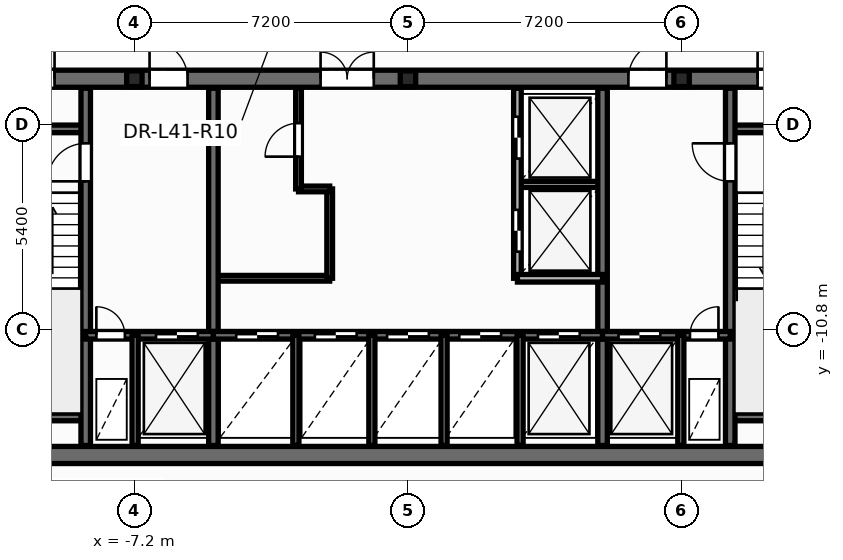
"""IFC4 building model, lengths in metres.
Left out: names, types, materials, properties, quantities, classifications, styles, units other than length and angle.
Written with IfcOpenShell. Run it as: python <this file> out.ifc"""

import sys

from ifc_helpers import new_model, si_unit, direction, frame, frame_2d, origin, origin_2d, place, context, subcontext, project, spatial, rectangle, i_section, extrude, element, fill, save


model = new_model("IFC4")
c1 = context("Model", 3, precision=1e-05, world=origin(), true_north=direction((0.0, 1.0)))
c2 = subcontext(c1, "Body", "Model", "MODEL_VIEW")
j1 = project(units=[si_unit("LENGTHUNIT", "METRE"), si_unit("PLANEANGLEUNIT", "RADIAN")], contexts=[c1])
p1 = place(None, origin())
s1 = spatial("IfcSite", under=j1, at=p1, CompositionType="ELEMENT")
p2 = place(p1, origin())
s2 = spatial("IfcBuilding", under=s1, at=p2, CompositionType="ELEMENT")
p3 = place(p2, frame((0.0, 0.0, 158.1)))
s3 = spatial("IfcBuildingStorey", under=s2, at=p3, CompositionType="ELEMENT", Elevation=158.1)
for number, where, z_axis, x_axis in (
    (1, (-7.2, -4.2, 0.0), (0.0, 0.0, 1.0), (1.0, 0.0, 0.0)),
    (2, (0.0, -4.2, 0.0), (0.0, 0.0, 1.0), (1.0, 0.0, 0.0)),
    (3, (7.2, -4.2, 0.0), (0.0, 0.0, 1.0), (1.0, 0.0, 0.0)),
):
    element("IfcColumn", number, at=place(p3, frame(where, z_axis=z_axis, x_axis=x_axis)), inside=s3, PredefinedType="PILASTER", context=c2, shape_type="SweptSolid", body=[
        extrude(i_section(OverallWidth=0.405, OverallDepth=0.414, WebThickness=0.022, FlangeThickness=0.032, at=origin_2d()), origin(), (0.0, 0.0, 1.0), 3.6),
    ])
p4 = place(p3, frame((-5.12, -9.45, 0.0), z_axis=(0.0, 0.0, 1.0), x_axis=(1.0, 0.0, 0.0)))
e4 = element("IfcWall", 4, at=p4, inside=s3, PredefinedType="PARTITIONING", context=c2, shape_type="SweptSolid", body=[
    extrude(rectangle(XDim=3.06, YDim=0.15, at=frame_2d((1.53, 0.0))), origin(), (0.0, 0.0, 1.0), 3.35),
])
p5 = place(p3, frame((-2.06, -9.45, 0.0), z_axis=(0.0, 0.0, 1.0), x_axis=(0.0, 1.0, 0.0)))
e5 = element("IfcWall", 5, at=p5, inside=s3, PredefinedType="PARTITIONING", context=c2, shape_type="SweptSolid", body=[
    extrude(rectangle(XDim=2.35, YDim=0.15, at=frame_2d((1.175, 0.0))), origin(), (0.0, 0.0, 1.0), 3.35),
])
p6 = place(p3, frame((-2.88, -7.1, 0.0), z_axis=(0.0, 0.0, 1.0), x_axis=(1.0, 0.0, 0.0)))
e6 = element("IfcWall", 6, at=p6, inside=s3, PredefinedType="PARTITIONING", context=c2, shape_type="SweptSolid", body=[
    extrude(rectangle(XDim=0.82, YDim=0.15, at=frame_2d((0.41, 0.0))), origin(), (0.0, 0.0, 1.0), 3.35),
])
p7 = place(p3, frame((-2.88, -7.1, 0.0), z_axis=(0.0, 0.0, 1.0), x_axis=(0.0, 1.0, 0.0)))
e7 = element("IfcWall", 7, at=p7, inside=s3, PredefinedType="PARTITIONING", context=c2, shape_type="SweptSolid", body=[
    extrude(rectangle(XDim=2.65, YDim=0.15, at=frame_2d((1.325, 0.0))), origin(), (0.0, 0.0, 1.0), 3.35),
])
p8 = place(p7, frame((0.85, 0.0, 0.0)))
e8 = element("IfcOpeningElement", 8, at=p8, cuts=e7, PredefinedType="OPENING", context=c2, shape_type="SweptSolid", body=[
    extrude(rectangle(XDim=0.886, YDim=2.104, at=frame_2d((0.44, 1.052))), frame((0.0, 0.085, 0.0), z_axis=(0.0, -1.0, 0.0), x_axis=(1.0, 0.0, 0.0)), (0.0, 0.0, 1.0), 0.17),
])
p9 = place(p3, frame((2.88, -6.98, 0.0), z_axis=(0.0, 0.0, 1.0), x_axis=(1.0, 0.0, 0.0)))
e9 = element("IfcWall", 9, at=p9, inside=s3, PredefinedType="PARTITIONING", context=c2, shape_type="SweptSolid", body=[
    extrude(rectangle(XDim=2.24, YDim=0.16, at=frame_2d((1.12, 0.0))), origin(), (0.0, 0.0, 1.0), 3.35),
])
p10 = place(p3, frame((-12.65, -14.1, 0.0), z_axis=(0.0, 0.0, 1.0), x_axis=(1.0, 0.0, 0.0)))
e10 = element("IfcWall", 10, at=p10, inside=s3, PredefinedType="SHEAR", context=c2, shape_type="SweptSolid", body=[
    extrude(rectangle(XDim=25.3, YDim=0.45, at=frame_2d((12.65, 0.0))), origin(), (0.0, 0.0, 1.0), 3.6),
])
p11 = place(p3, frame((-12.65, -4.2, 0.0), z_axis=(0.0, 0.0, 1.0), x_axis=(1.0, 0.0, 0.0)))
e11 = element("IfcWall", 11, at=p11, inside=s3, PredefinedType="SHEAR", context=c2, shape_type="SweptSolid", body=[
    extrude(rectangle(XDim=25.3, YDim=0.45, at=frame_2d((12.65, 0.0))), origin(), (0.0, 0.0, 1.0), 3.6),
])
p12 = place(p11, frame((0.95, 0.0, 0.0)))
e12 = element("IfcOpeningElement", 12, at=p12, cuts=e11, PredefinedType="OPENING", context=c2, shape_type="SweptSolid", body=[
    extrude(rectangle(XDim=0.756, YDim=2.054, at=frame_2d((0.375, 1.027))), frame((0.0, 0.235, 0.0), z_axis=(0.0, -1.0, 0.0), x_axis=(1.0, 0.0, 0.0)), (0.0, 0.0, 1.0), 0.47),
])
p13 = place(p11, frame((2.6, 0.0, 0.0)))
e13 = element("IfcOpeningElement", 13, at=p13, cuts=e11, PredefinedType="OPENING", context=c2, shape_type="SweptSolid", body=[
    extrude(rectangle(XDim=0.756, YDim=2.054, at=frame_2d((0.375, 1.027))), frame((0.0, 0.235, 0.0), z_axis=(0.0, -1.0, 0.0), x_axis=(1.0, 0.0, 0.0)), (0.0, 0.0, 1.0), 0.47),
])
p14 = place(p11, frame((21.85, 0.0, 0.0)))
e14 = element("IfcOpeningElement", 14, at=p14, cuts=e11, PredefinedType="OPENING", context=c2, shape_type="SweptSolid", body=[
    extrude(rectangle(XDim=0.756, YDim=2.054, at=frame_2d((0.375, 1.027))), frame((0.0, 0.235, 0.0), z_axis=(0.0, -1.0, 0.0), x_axis=(1.0, 0.0, 0.0)), (0.0, 0.0, 1.0), 0.47),
])
p15 = place(p11, frame((23.5, 0.0, 0.0)))
e15 = element("IfcOpeningElement", 15, at=p15, cuts=e11, PredefinedType="OPENING", context=c2, shape_type="SweptSolid", body=[
    extrude(rectangle(XDim=0.756, YDim=2.054, at=frame_2d((0.375, 1.027))), frame((0.0, 0.235, 0.0), z_axis=(0.0, -1.0, 0.0), x_axis=(1.0, 0.0, 0.0)), (0.0, 0.0, 1.0), 0.47),
])
p16 = place(p11, frame((5.85, 0.0, 0.0)))
e16 = element("IfcOpeningElement", 16, at=p16, cuts=e11, PredefinedType="OPENING", context=c2, shape_type="SweptSolid", body=[
    extrude(rectangle(XDim=1.006, YDim=2.104, at=frame_2d((0.5, 1.052))), frame((0.0, 0.235, 0.0), z_axis=(0.0, -1.0, 0.0), x_axis=(1.0, 0.0, 0.0)), (0.0, 0.0, 1.0), 0.47),
])
p17 = place(p11, frame((10.35, 0.0, 0.0)))
e17 = element("IfcOpeningElement", 17, at=p17, cuts=e11, PredefinedType="OPENING", context=c2, shape_type="SweptSolid", body=[
    extrude(rectangle(XDim=1.406, YDim=2.154, at=frame_2d((0.7, 1.077))), frame((0.0, 0.235, 0.0), z_axis=(0.0, -1.0, 0.0), x_axis=(1.0, 0.0, 0.0)), (0.0, 0.0, 1.0), 0.47),
])
p18 = place(p11, frame((18.45, 0.0, 0.0)))
e18 = element("IfcOpeningElement", 18, at=p18, cuts=e11, PredefinedType="OPENING", context=c2, shape_type="SweptSolid", body=[
    extrude(rectangle(XDim=1.006, YDim=2.104, at=frame_2d((0.5, 1.052))), frame((0.0, 0.235, 0.0), z_axis=(0.0, -1.0, 0.0), x_axis=(1.0, 0.0, 0.0)), (0.0, 0.0, 1.0), 0.47),
])
for number, where, z_axis, x_axis in (
    (19, (-12.35, -5.52, 0.0), (0.0, 0.0, 1.0), (1.0, 0.0, 0.0)),
    (20, (-12.35, -13.1, 0.0), (0.0, 0.0, 1.0), (1.0, 0.0, 0.0)),
    (21, (8.48, -5.52, 0.0), (0.0, 0.0, 1.0), (1.0, 0.0, 0.0)),
    (22, (8.48, -13.1, 0.0), (0.0, 0.0, 1.0), (1.0, 0.0, 0.0)),
):
    element("IfcWall", number, at=place(p3, frame(where, z_axis=z_axis, x_axis=x_axis)), inside=s3, PredefinedType="SOLIDWALL", context=c2, shape_type="SweptSolid", body=[
        extrude(rectangle(XDim=3.87, YDim=0.2, at=frame_2d((1.935, 0.0))), origin(), (0.0, 0.0, 1.0), 3.6),
    ])
p19 = place(p3, frame((-8.48, -13.85, 0.0), z_axis=(0.0, 0.0, 1.0), x_axis=(0.0, 1.0, 0.0)))
e23 = element("IfcWall", 23, at=p19, inside=s3, PredefinedType="SHEAR", context=c2, shape_type="SweptSolid", body=[
    extrude(rectangle(XDim=9.4, YDim=0.25, at=frame_2d((4.7, 0.0))), origin(), (0.0, 0.0, 1.0), 3.6),
])
p20 = place(p19, frame((6.95, 0.0, 0.0)))
e24 = element("IfcOpeningElement", 24, at=p20, cuts=e23, PredefinedType="OPENING", context=c2, shape_type="SweptSolid", body=[
    extrude(rectangle(XDim=1.006, YDim=2.104, at=frame_2d((0.5, 1.052))), frame((0.0, 0.135, 0.0), z_axis=(0.0, -1.0, 0.0), x_axis=(1.0, 0.0, 0.0)), (0.0, 0.0, 1.0), 0.27),
])
p21 = place(p3, frame((8.48, -13.85, 0.0), z_axis=(0.0, 0.0, 1.0), x_axis=(0.0, 1.0, 0.0)))
e25 = element("IfcWall", 25, at=p21, inside=s3, PredefinedType="SHEAR", context=c2, shape_type="SweptSolid", body=[
    extrude(rectangle(XDim=9.4, YDim=0.25, at=frame_2d((4.7, 0.0))), origin(), (0.0, 0.0, 1.0), 3.6),
])
p22 = place(p21, frame((6.95, 0.0, 0.0)))
e26 = element("IfcOpeningElement", 26, at=p22, cuts=e25, PredefinedType="OPENING", context=c2, shape_type="SweptSolid", body=[
    extrude(rectangle(XDim=1.006, YDim=2.104, at=frame_2d((0.5, 1.052))), frame((0.0, 0.135, 0.0), z_axis=(0.0, -1.0, 0.0), x_axis=(1.0, 0.0, 0.0)), (0.0, 0.0, 1.0), 0.27),
])
for number, where, z_axis, x_axis in (
    (27, (-5.12, -13.85, 0.0), (0.0, 0.0, 1.0), (0.0, 1.0, 0.0)),
    (28, (5.12, -13.85, 0.0), (0.0, 0.0, 1.0), (0.0, 1.0, 0.0)),
):
    element("IfcWall", number, at=place(p3, frame(where, z_axis=z_axis, x_axis=x_axis)), inside=s3, PredefinedType="SHEAR", context=c2, shape_type="SweptSolid", body=[
        extrude(rectangle(XDim=9.4, YDim=0.25, at=frame_2d((4.7, 0.0))), origin(), (0.0, 0.0, 1.0), 3.6),
    ])
p23 = place(p3, frame((-8.48, -10.95, 0.0), z_axis=(0.0, 0.0, 1.0), x_axis=(1.0, 0.0, 0.0)))
e29 = element("IfcWall", 29, at=p23, inside=s3, PredefinedType="SOLIDWALL", context=c2, shape_type="SweptSolid", body=[
    extrude(rectangle(XDim=3.36, YDim=0.2, at=frame_2d((1.68, 0.0))), origin(), (0.0, 0.0, 1.0), 3.6),
])
p24 = place(p23, frame((0.28, 0.0, 0.0)))
e30 = element("IfcOpeningElement", 30, at=p24, cuts=e29, PredefinedType="OPENING", context=c2, shape_type="SweptSolid", body=[
    extrude(rectangle(XDim=0.756, YDim=2.054, at=frame_2d((0.375, 1.027))), frame((0.0, 0.11, 0.0), z_axis=(0.0, -1.0, 0.0), x_axis=(1.0, 0.0, 0.0)), (0.0, 0.0, 1.0), 0.22),
])
p25 = place(p23, frame((1.85, 0.0, 0.0)))
e31 = element("IfcOpeningElement", 31, at=p25, cuts=e29, PredefinedType="OPENING", context=c2, shape_type="SweptSolid", body=[
    extrude(rectangle(XDim=1.106, YDim=2.104, at=frame_2d((0.55, 1.052))), frame((0.0, 0.11, 0.0), z_axis=(0.0, -1.0, 0.0), x_axis=(1.0, 0.0, 0.0)), (0.0, 0.0, 1.0), 0.22),
])
p26 = place(p3, frame((-5.12, -10.95, 0.0), z_axis=(0.0, 0.0, 1.0), x_axis=(1.0, 0.0, 0.0)))
e32 = element("IfcWall", 32, at=p26, inside=s3, PredefinedType="SOLIDWALL", context=c2, shape_type="SweptSolid", body=[
    extrude(rectangle(XDim=10.24, YDim=0.2, at=frame_2d((5.12, 0.0))), origin(), (0.0, 0.0, 1.0), 3.6),
])
p27 = place(p26, frame((0.6, 0.0, 0.0)))
e33 = element("IfcOpeningElement", 33, at=p27, cuts=e32, PredefinedType="OPENING", context=c2, shape_type="SweptSolid", body=[
    extrude(rectangle(XDim=1.106, YDim=2.104, at=frame_2d((0.55, 1.052))), frame((0.0, 0.11, 0.0), z_axis=(0.0, -1.0, 0.0), x_axis=(1.0, 0.0, 0.0)), (0.0, 0.0, 1.0), 0.22),
])
p28 = place(p26, frame((2.67, 0.0, 0.0)))
e34 = element("IfcOpeningElement", 34, at=p28, cuts=e32, PredefinedType="OPENING", context=c2, shape_type="SweptSolid", body=[
    extrude(rectangle(XDim=1.106, YDim=2.104, at=frame_2d((0.55, 1.052))), frame((0.0, 0.11, 0.0), z_axis=(0.0, -1.0, 0.0), x_axis=(1.0, 0.0, 0.0)), (0.0, 0.0, 1.0), 0.22),
])
p29 = place(p26, frame((4.57, 0.0, 0.0)))
e35 = element("IfcOpeningElement", 35, at=p29, cuts=e32, PredefinedType="OPENING", context=c2, shape_type="SweptSolid", body=[
    extrude(rectangle(XDim=1.106, YDim=2.104, at=frame_2d((0.55, 1.052))), frame((0.0, 0.11, 0.0), z_axis=(0.0, -1.0, 0.0), x_axis=(1.0, 0.0, 0.0)), (0.0, 0.0, 1.0), 0.22),
])
p30 = place(p26, frame((6.47, 0.0, 0.0)))
e36 = element("IfcOpeningElement", 36, at=p30, cuts=e32, PredefinedType="OPENING", context=c2, shape_type="SweptSolid", body=[
    extrude(rectangle(XDim=1.106, YDim=2.104, at=frame_2d((0.55, 1.052))), frame((0.0, 0.11, 0.0), z_axis=(0.0, -1.0, 0.0), x_axis=(1.0, 0.0, 0.0)), (0.0, 0.0, 1.0), 0.22),
])
p31 = place(p26, frame((8.54, 0.0, 0.0)))
e37 = element("IfcOpeningElement", 37, at=p31, cuts=e32, PredefinedType="OPENING", context=c2, shape_type="SweptSolid", body=[
    extrude(rectangle(XDim=1.106, YDim=2.104, at=frame_2d((0.55, 1.052))), frame((0.0, 0.11, 0.0), z_axis=(0.0, -1.0, 0.0), x_axis=(1.0, 0.0, 0.0)), (0.0, 0.0, 1.0), 0.22),
])
p32 = place(p3, frame((5.12, -10.95, 0.0), z_axis=(0.0, 0.0, 1.0), x_axis=(1.0, 0.0, 0.0)))
e38 = element("IfcWall", 38, at=p32, inside=s3, PredefinedType="SOLIDWALL", context=c2, shape_type="SweptSolid", body=[
    extrude(rectangle(XDim=3.36, YDim=0.2, at=frame_2d((1.68, 0.0))), origin(), (0.0, 0.0, 1.0), 3.6),
])
p33 = place(p32, frame((0.42, 0.0, 0.0)))
e39 = element("IfcOpeningElement", 39, at=p33, cuts=e38, PredefinedType="OPENING", context=c2, shape_type="SweptSolid", body=[
    extrude(rectangle(XDim=1.106, YDim=2.104, at=frame_2d((0.55, 1.052))), frame((0.0, 0.11, 0.0), z_axis=(0.0, -1.0, 0.0), x_axis=(1.0, 0.0, 0.0)), (0.0, 0.0, 1.0), 0.22),
])
p34 = place(p32, frame((2.3, 0.0, 0.0)))
e40 = element("IfcOpeningElement", 40, at=p34, cuts=e38, PredefinedType="OPENING", context=c2, shape_type="SweptSolid", body=[
    extrude(rectangle(XDim=0.756, YDim=2.054, at=frame_2d((0.375, 1.027))), frame((0.0, 0.11, 0.0), z_axis=(0.0, -1.0, 0.0), x_axis=(1.0, 0.0, 0.0)), (0.0, 0.0, 1.0), 0.22),
])
for number, where, z_axis, x_axis in (
    (41, (-7.18, -13.85, 0.0), (0.0, 0.0, 1.0), (0.0, 1.0, 0.0)),
    (42, (7.18, -13.85, 0.0), (0.0, 0.0, 1.0), (0.0, 1.0, 0.0)),
    (43, (-2.95, -13.85, 0.0), (0.0, 0.0, 1.0), (0.0, 1.0, 0.0)),
    (44, (2.95, -13.85, 0.0), (0.0, 0.0, 1.0), (0.0, 1.0, 0.0)),
):
    element("IfcWall", number, at=place(p3, frame(where, z_axis=z_axis, x_axis=x_axis)), inside=s3, PredefinedType="PARTITIONING", context=c2, shape_type="SweptSolid", body=[
        extrude(rectangle(XDim=2.9, YDim=0.16, at=frame_2d((1.45, 0.0))), origin(), (0.0, 0.0, 1.0), 2.475),
    ])
p35 = place(p3, frame((2.88, -9.45, 0.0), z_axis=(0.0, 0.0, 1.0), x_axis=(0.0, 1.0, 0.0)))
e45 = element("IfcWall", 45, at=p35, inside=s3, PredefinedType="SOLIDWALL", context=c2, shape_type="SweptSolid", body=[
    extrude(rectangle(XDim=5.0, YDim=0.2, at=frame_2d((2.5, 0.0))), origin(), (0.0, 0.0, 1.0), 3.35),
])
p36 = place(p35, frame((0.7, 0.0, 0.0)))
e46 = element("IfcOpeningElement", 46, at=p36, cuts=e45, PredefinedType="OPENING", context=c2, shape_type="SweptSolid", body=[
    extrude(rectangle(XDim=1.106, YDim=2.104, at=frame_2d((0.55, 1.052))), frame((0.0, 0.11, 0.0), z_axis=(0.0, -1.0, 0.0), x_axis=(1.0, 0.0, 0.0)), (0.0, 0.0, 1.0), 0.22),
])
p37 = place(p35, frame((3.15, 0.0, 0.0)))
e47 = element("IfcOpeningElement", 47, at=p37, cuts=e45, PredefinedType="OPENING", context=c2, shape_type="SweptSolid", body=[
    extrude(rectangle(XDim=1.106, YDim=2.104, at=frame_2d((0.55, 1.052))), frame((0.0, 0.11, 0.0), z_axis=(0.0, -1.0, 0.0), x_axis=(1.0, 0.0, 0.0)), (0.0, 0.0, 1.0), 0.22),
])
p38 = place(p3, frame((2.88, -9.45, 0.0), z_axis=(0.0, 0.0, 1.0), x_axis=(1.0, 0.0, 0.0)))
e48 = element("IfcWall", 48, at=p38, inside=s3, PredefinedType="SOLIDWALL", context=c2, shape_type="SweptSolid", body=[
    extrude(rectangle(XDim=2.24, YDim=0.2, at=frame_2d((1.12, 0.0))), origin(), (0.0, 0.0, 1.0), 3.35),
])
for number, where, z_axis, x_axis in (
    (49, (-0.95, -13.85, 0.0), (0.0, 0.0, 1.0), (0.0, 1.0, 0.0)),
    (50, (0.95, -13.85, 0.0), (0.0, 0.0, 1.0), (0.0, 1.0, 0.0)),
):
    element("IfcWall", number, at=place(p3, frame(where, z_axis=z_axis, x_axis=x_axis)), inside=s3, PredefinedType="PARTITIONING", context=c2, shape_type="SweptSolid", body=[
        extrude(rectangle(XDim=2.9, YDim=0.16, at=frame_2d((1.45, 0.0))), origin(), (0.0, 0.0, 1.0), 2.475),
    ])
p39 = place(p8, origin())
e51 = element("IfcDoor", 51, at=p39, inside=s3, OperationType="SINGLE_SWING_LEFT", PredefinedType="DOOR", context=c2, shape_type="SweptSolid", body=[
    extrude(rectangle(XDim=0.88, YDim=2.1, at=frame_2d((0.44, 1.05))), frame((0.0, 0.025, 0.0), z_axis=(0.0, -1.0, 0.0), x_axis=(1.0, 0.0, 0.0)), (0.0, 0.0, 1.0), 0.05),
])
fill(e8, e51)
p40 = place(p36, origin())
e52 = element("IfcDoor", 52, at=p40, inside=s3, OperationType="DOUBLE_DOOR_SLIDING", PredefinedType="DOOR", context=c2, shape_type="SweptSolid", body=[
    extrude(rectangle(XDim=1.1, YDim=2.1, at=frame_2d((0.55, 1.05))), frame((0.0, 0.025, 0.0), z_axis=(0.0, -1.0, 0.0), x_axis=(1.0, 0.0, 0.0)), (0.0, 0.0, 1.0), 0.05),
])
fill(e46, e52)
p41 = place(p37, origin())
e53 = element("IfcDoor", 53, at=p41, inside=s3, OperationType="DOUBLE_DOOR_SLIDING", PredefinedType="DOOR", context=c2, shape_type="SweptSolid", body=[
    extrude(rectangle(XDim=1.1, YDim=2.1, at=frame_2d((0.55, 1.05))), frame((0.0, 0.025, 0.0), z_axis=(0.0, -1.0, 0.0), x_axis=(1.0, 0.0, 0.0)), (0.0, 0.0, 1.0), 0.05),
])
fill(e47, e53)
p42 = place(p20, origin())
e54 = element("IfcDoor", 54, at=p42, inside=s3, OperationType="SINGLE_SWING_LEFT", PredefinedType="DOOR", context=c2, shape_type="SweptSolid", body=[
    extrude(rectangle(XDim=1.0, YDim=2.1, at=frame_2d((0.5, 1.05))), frame((0.0, 0.025, 0.0), z_axis=(0.0, -1.0, 0.0), x_axis=(1.0, 0.0, 0.0)), (0.0, 0.0, 1.0), 0.05),
])
fill(e24, e54)
p43 = place(p22, origin())
e55 = element("IfcDoor", 55, at=p43, inside=s3, OperationType="SINGLE_SWING_RIGHT", PredefinedType="DOOR", context=c2, shape_type="SweptSolid", body=[
    extrude(rectangle(XDim=1.0, YDim=2.1, at=frame_2d((0.5, 1.05))), frame((0.0, 0.025, 0.0), z_axis=(0.0, -1.0, 0.0), x_axis=(1.0, 0.0, 0.0)), (0.0, 0.0, 1.0), 0.05),
])
fill(e26, e55)
p44 = place(p24, origin())
e56 = element("IfcDoor", 56, at=p44, inside=s3, OperationType="SINGLE_SWING_LEFT", PredefinedType="DOOR", context=c2, shape_type="SweptSolid", body=[
    extrude(rectangle(XDim=0.75, YDim=2.05, at=frame_2d((0.375, 1.025))), frame((0.0, 0.025, 0.0), z_axis=(0.0, -1.0, 0.0), x_axis=(1.0, 0.0, 0.0)), (0.0, 0.0, 1.0), 0.05),
])
fill(e30, e56)
p45 = place(p25, origin())
e57 = element("IfcDoor", 57, at=p45, inside=s3, OperationType="DOUBLE_DOOR_SLIDING", PredefinedType="DOOR", context=c2, shape_type="SweptSolid", body=[
    extrude(rectangle(XDim=1.1, YDim=2.1, at=frame_2d((0.55, 1.05))), frame((0.0, 0.025, 0.0), z_axis=(0.0, -1.0, 0.0), x_axis=(1.0, 0.0, 0.0)), (0.0, 0.0, 1.0), 0.05),
])
fill(e31, e57)
p46 = place(p33, origin())
e58 = element("IfcDoor", 58, at=p46, inside=s3, OperationType="DOUBLE_DOOR_SLIDING", PredefinedType="DOOR", context=c2, shape_type="SweptSolid", body=[
    extrude(rectangle(XDim=1.1, YDim=2.1, at=frame_2d((0.55, 1.05))), frame((0.0, 0.025, 0.0), z_axis=(0.0, -1.0, 0.0), x_axis=(1.0, 0.0, 0.0)), (0.0, 0.0, 1.0), 0.05),
])
fill(e39, e58)
p47 = place(p34, origin())
e59 = element("IfcDoor", 59, at=p47, inside=s3, OperationType="SINGLE_SWING_RIGHT", PredefinedType="DOOR", context=c2, shape_type="SweptSolid", body=[
    extrude(rectangle(XDim=0.75, YDim=2.05, at=frame_2d((0.375, 1.025))), frame((0.0, 0.025, 0.0), z_axis=(0.0, -1.0, 0.0), x_axis=(1.0, 0.0, 0.0)), (0.0, 0.0, 1.0), 0.05),
])
fill(e40, e59)
p48 = place(p27, origin())
e60 = element("IfcDoor", 60, at=p48, inside=s3, OperationType="DOUBLE_DOOR_SLIDING", PredefinedType="DOOR", context=c2, shape_type="SweptSolid", body=[
    extrude(rectangle(XDim=1.1, YDim=2.1, at=frame_2d((0.55, 1.05))), frame((0.0, 0.025, 0.0), z_axis=(0.0, -1.0, 0.0), x_axis=(1.0, 0.0, 0.0)), (0.0, 0.0, 1.0), 0.05),
])
fill(e33, e60)
p49 = place(p28, origin())
e61 = element("IfcDoor", 61, at=p49, inside=s3, OperationType="DOUBLE_DOOR_SLIDING", PredefinedType="DOOR", context=c2, shape_type="SweptSolid", body=[
    extrude(rectangle(XDim=1.1, YDim=2.1, at=frame_2d((0.55, 1.05))), frame((0.0, 0.025, 0.0), z_axis=(0.0, -1.0, 0.0), x_axis=(1.0, 0.0, 0.0)), (0.0, 0.0, 1.0), 0.05),
])
fill(e34, e61)
p50 = place(p29, origin())
e62 = element("IfcDoor", 62, at=p50, inside=s3, OperationType="DOUBLE_DOOR_SLIDING", PredefinedType="DOOR", context=c2, shape_type="SweptSolid", body=[
    extrude(rectangle(XDim=1.1, YDim=2.1, at=frame_2d((0.55, 1.05))), frame((0.0, 0.025, 0.0), z_axis=(0.0, -1.0, 0.0), x_axis=(1.0, 0.0, 0.0)), (0.0, 0.0, 1.0), 0.05),
])
fill(e35, e62)
p51 = place(p30, origin())
e63 = element("IfcDoor", 63, at=p51, inside=s3, OperationType="DOUBLE_DOOR_SLIDING", PredefinedType="DOOR", context=c2, shape_type="SweptSolid", body=[
    extrude(rectangle(XDim=1.1, YDim=2.1, at=frame_2d((0.55, 1.05))), frame((0.0, 0.025, 0.0), z_axis=(0.0, -1.0, 0.0), x_axis=(1.0, 0.0, 0.0)), (0.0, 0.0, 1.0), 0.05),
])
fill(e36, e63)
p52 = place(p31, origin())
e64 = element("IfcDoor", 64, at=p52, inside=s3, OperationType="DOUBLE_DOOR_SLIDING", PredefinedType="DOOR", context=c2, shape_type="SweptSolid", body=[
    extrude(rectangle(XDim=1.1, YDim=2.1, at=frame_2d((0.55, 1.05))), frame((0.0, 0.025, 0.0), z_axis=(0.0, -1.0, 0.0), x_axis=(1.0, 0.0, 0.0)), (0.0, 0.0, 1.0), 0.05),
])
fill(e37, e64)
p53 = place(p13, origin())
e65 = element("IfcDoor", 65, at=p53, inside=s3, OperationType="SINGLE_SWING_RIGHT", PredefinedType="DOOR", context=c2, shape_type="SweptSolid", body=[
    extrude(rectangle(XDim=0.75, YDim=2.05, at=frame_2d((0.375, 1.025))), frame((0.0, 0.025, 0.0), z_axis=(0.0, -1.0, 0.0), x_axis=(1.0, 0.0, 0.0)), (0.0, 0.0, 1.0), 0.05),
])
fill(e13, e65)
p54 = place(p14, origin())
e66 = element("IfcDoor", 66, at=p54, inside=s3, OperationType="SINGLE_SWING_LEFT", PredefinedType="DOOR", context=c2, shape_type="SweptSolid", body=[
    extrude(rectangle(XDim=0.75, YDim=2.05, at=frame_2d((0.375, 1.025))), frame((0.0, 0.025, 0.0), z_axis=(0.0, -1.0, 0.0), x_axis=(1.0, 0.0, 0.0)), (0.0, 0.0, 1.0), 0.05),
])
fill(e14, e66)
p55 = place(p16, origin())
e67 = element("IfcDoor", 67, at=p55, inside=s3, OperationType="SINGLE_SWING_LEFT", PredefinedType="DOOR", context=c2, shape_type="SweptSolid", body=[
    extrude(rectangle(XDim=1.0, YDim=2.1, at=frame_2d((0.5, 1.05))), frame((0.0, 0.025, 0.0), z_axis=(0.0, -1.0, 0.0), x_axis=(1.0, 0.0, 0.0)), (0.0, 0.0, 1.0), 0.05),
])
fill(e16, e67)
p56 = place(p17, origin())
e68 = element("IfcDoor", 68, at=p56, inside=s3, OperationType="DOUBLE_DOOR_SINGLE_SWING", PredefinedType="DOOR", context=c2, shape_type="SweptSolid", body=[
    extrude(rectangle(XDim=1.4, YDim=2.15, at=frame_2d((0.7, 1.075))), frame((0.0, 0.025, 0.0), z_axis=(0.0, -1.0, 0.0), x_axis=(1.0, 0.0, 0.0)), (0.0, 0.0, 1.0), 0.05),
])
fill(e17, e68)
p57 = place(p18, origin())
e69 = element("IfcDoor", 69, at=p57, inside=s3, OperationType="SINGLE_SWING_RIGHT", PredefinedType="DOOR", context=c2, shape_type="SweptSolid", body=[
    extrude(rectangle(XDim=1.0, YDim=2.1, at=frame_2d((0.5, 1.05))), frame((0.0, 0.025, 0.0), z_axis=(0.0, -1.0, 0.0), x_axis=(1.0, 0.0, 0.0)), (0.0, 0.0, 1.0), 0.05),
])
fill(e18, e69)
save(model, sys.argv[1])
